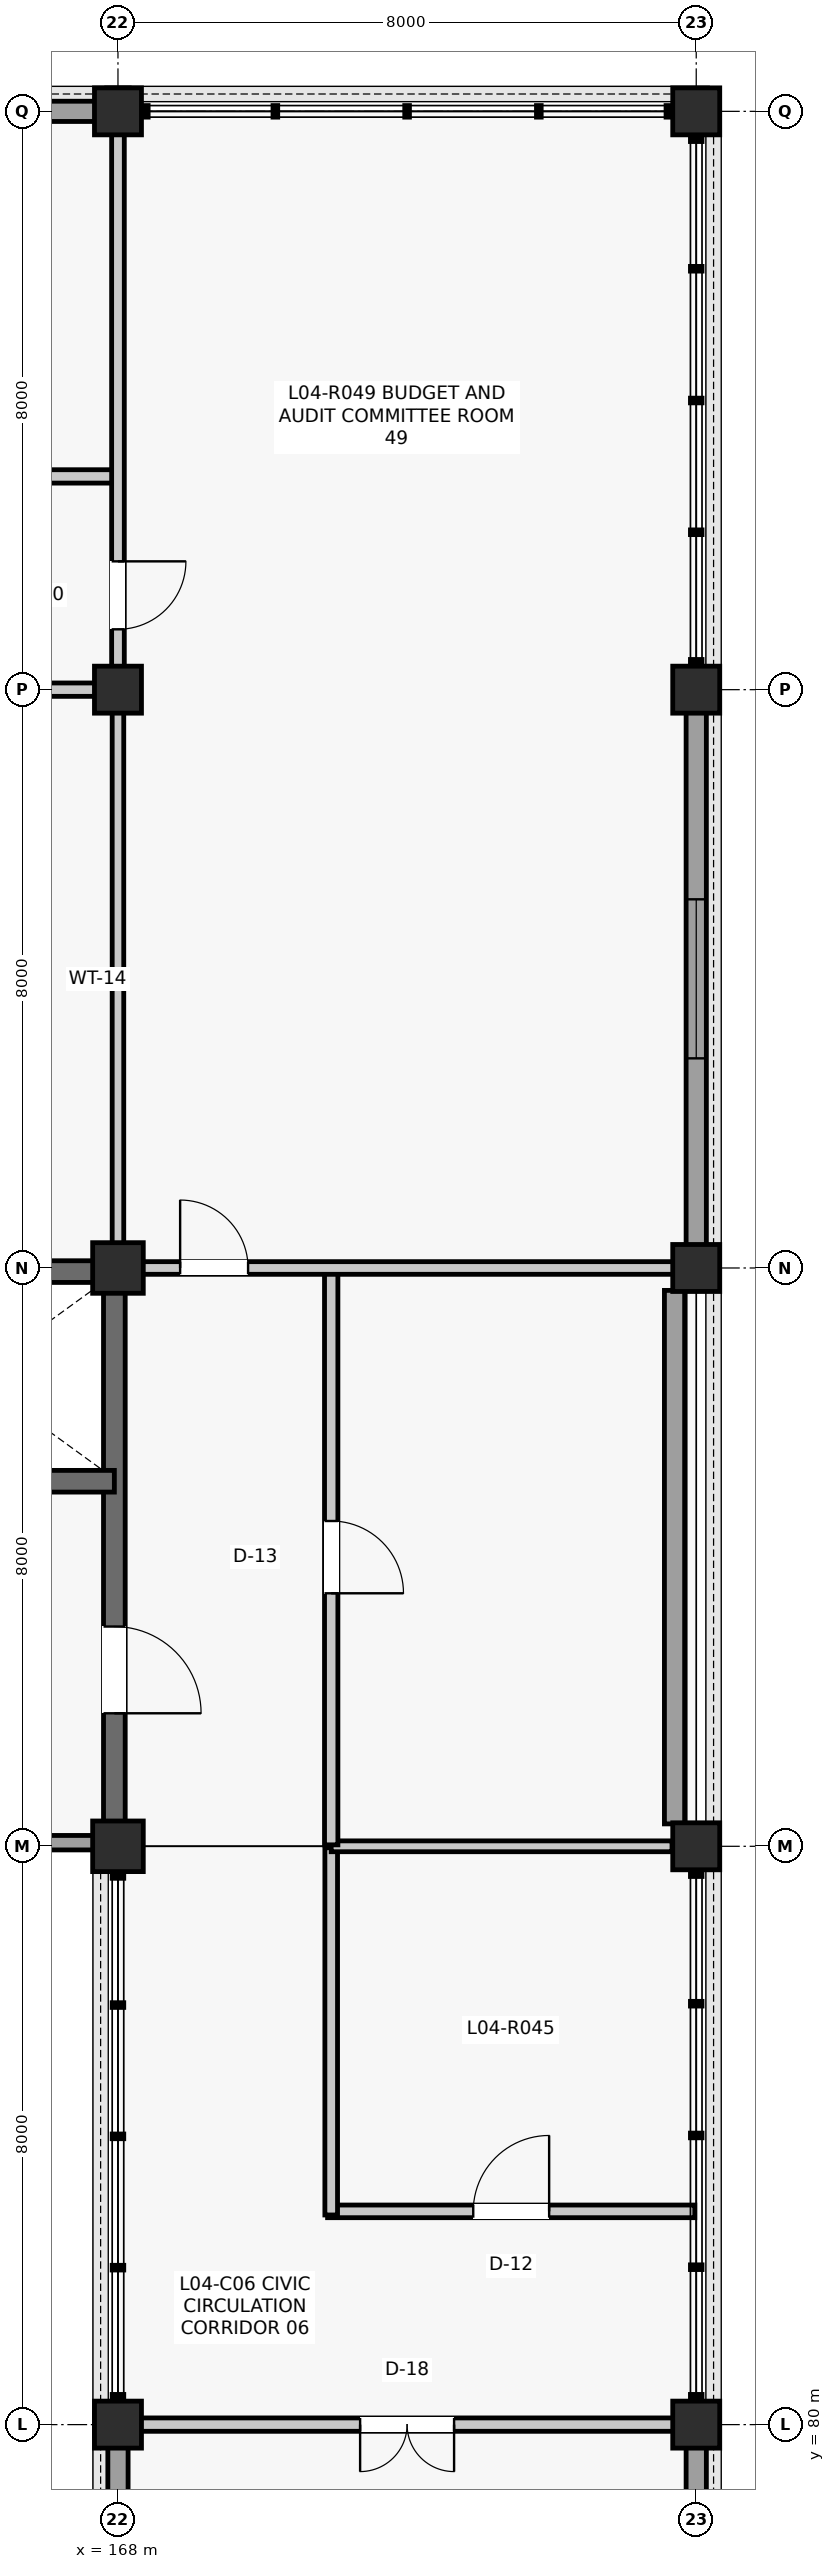
"""IFC4 building model, lengths in metres.
Left out: names, types, materials, properties, quantities, classifications, styles, units other than length and angle.
Written with IfcOpenShell. Run it as: python <this file> out.ifc"""

import sys

from ifc_helpers import new_model, si_unit, direction, frame, frame_2d, origin, origin_2d, place, context, subcontext, project, spatial, rectangle, extrude, element, fill, save


model = new_model("IFC4")
c1 = context("Model", 3, precision=1e-05, world=origin(), true_north=direction((0.0, 1.0)))
c2 = subcontext(c1, "Body", "Model", "MODEL_VIEW")
j1 = project(units=[si_unit("LENGTHUNIT", "METRE"), si_unit("PLANEANGLEUNIT", "RADIAN")], contexts=[c1])
p1 = place(None, origin())
s1 = spatial("IfcSite", under=j1, at=p1, CompositionType="ELEMENT")
p2 = place(p1, origin())
s2 = spatial("IfcBuilding", under=s1, at=p2, CompositionType="ELEMENT")
p3 = place(p2, frame((0.0, 0.0, 17.82)))
s3 = spatial("IfcBuildingStorey", under=s2, at=p3, CompositionType="ELEMENT", Elevation=17.82)
p4 = place(p3, frame((168.0, 80.0, 0.0), z_axis=(0.0, 0.0, 1.0), x_axis=(1.0, 0.0, 0.0)))
e1 = element("IfcColumn", 1, at=p4, inside=s3, PredefinedType="COLUMN", context=c2, shape_type="SweptSolid", body=[
    extrude(rectangle(XDim=0.65, YDim=0.65, at=origin_2d()), origin(), (0.0, 0.0, 1.0), 3.96),
])
for number, where, z_axis, x_axis in (
    (2, (168.0, 88.0, 0.0), (0.0, 0.0, 1.0), (1.0, 0.0, 0.0)),
    (3, (168.0, 96.0, 0.0), (0.0, 0.0, 1.0), (1.0, 0.0, 0.0)),
):
    element("IfcColumn", number, at=place(p3, frame(where, z_axis=z_axis, x_axis=x_axis)), inside=s3, PredefinedType="COLUMN", context=c2, shape_type="SweptSolid", body=[
        extrude(rectangle(XDim=0.7, YDim=0.7, at=origin_2d()), origin(), (0.0, 0.0, 1.0), 3.96),
    ])
for number, where, z_axis, x_axis in (
    (4, (168.0, 104.0, 0.0), (0.0, 0.0, 1.0), (1.0, 0.0, 0.0)),
    (5, (168.0, 112.0, 0.0), (0.0, 0.0, 1.0), (1.0, 0.0, 0.0)),
    (6, (176.0, 80.0, 0.0), (0.0, 0.0, 1.0), (1.0, 0.0, 0.0)),
    (7, (176.0, 88.0, 0.0), (0.0, 0.0, 1.0), (1.0, 0.0, 0.0)),
    (8, (176.0, 96.0, 0.0), (0.0, 0.0, 1.0), (1.0, 0.0, 0.0)),
    (9, (176.0, 104.0, 0.0), (0.0, 0.0, 1.0), (1.0, 0.0, 0.0)),
    (10, (176.0, 112.0, 0.0), (0.0, 0.0, 1.0), (1.0, 0.0, 0.0)),
):
    element("IfcColumn", number, at=place(p3, frame(where, z_axis=z_axis, x_axis=x_axis)), inside=s3, PredefinedType="COLUMN", context=c2, shape_type="SweptSolid", body=[
        extrude(rectangle(XDim=0.65, YDim=0.65, at=origin_2d()), origin(), (0.0, 0.0, 1.0), 3.96),
    ])
p5 = place(p3, frame((160.31, 112.0, 0.0), z_axis=(0.0, 0.0, 1.0), x_axis=(1.0, 0.0, 0.0)))
e11 = element("IfcWall", 11, at=p5, inside=s3, PredefinedType="SOLIDWALL", context=c2, shape_type="SweptSolid", body=[
    extrude(rectangle(XDim=7.38, YDim=0.28, at=frame_2d((3.69, 0.0))), origin(), (0.0, 0.0, 1.0), 3.314),
])
p6 = place(p5, frame((2.59, 0.0, 0.9)))
e12 = element("IfcOpeningElement", 12, at=p6, cuts=e11, PredefinedType="OPENING", context=c2, shape_type="SweptSolid", body=[
    extrude(rectangle(XDim=2.2, YDim=2.0, at=frame_2d((1.1, 1.0))), frame((0.0, 0.15, 0.0), z_axis=(0.0, -1.0, 0.0), x_axis=(1.0, 0.0, 0.0)), (0.0, 0.0, 1.0), 0.3),
])
p7 = place(p3, frame((168.0, 72.26, 0.0), z_axis=(0.0, 0.0, 1.0), x_axis=(0.0, 1.0, 0.0)))
e13 = element("IfcWall", 13, at=p7, inside=s3, PredefinedType="SOLIDWALL", context=c2, shape_type="SweptSolid", body=[
    extrude(rectangle(XDim=7.43, YDim=0.28, at=frame_2d((3.715, 0.0))), origin(), (0.0, 0.0, 1.0), 3.309),
])
p8 = place(p7, frame((2.89, 0.0, 0.9)))
e14 = element("IfcOpeningElement", 14, at=p8, cuts=e13, PredefinedType="OPENING", context=c2, shape_type="SweptSolid", body=[
    extrude(rectangle(XDim=1.65, YDim=1.75, at=frame_2d((0.825, 0.875))), frame((0.0, 0.15, 0.0), z_axis=(0.0, -1.0, 0.0), x_axis=(1.0, 0.0, 0.0)), (0.0, 0.0, 1.0), 0.3),
])
p9 = place(p3, frame((176.0, 72.26, 0.0), z_axis=(0.0, 0.0, 1.0), x_axis=(0.0, 1.0, 0.0)))
e15 = element("IfcWall", 15, at=p9, inside=s3, PredefinedType="SOLIDWALL", context=c2, shape_type="SweptSolid", body=[
    extrude(rectangle(XDim=7.43, YDim=0.28, at=frame_2d((3.715, 0.0))), origin(), (0.0, 0.0, 1.0), 3.372),
])
p10 = place(p9, frame((2.89, 0.0, 0.9)))
e16 = element("IfcOpeningElement", 16, at=p10, cuts=e15, PredefinedType="OPENING", context=c2, shape_type="SweptSolid", body=[
    extrude(rectangle(XDim=1.65, YDim=1.75, at=frame_2d((0.825, 0.875))), frame((0.0, 0.15, 0.0), z_axis=(0.0, -1.0, 0.0), x_axis=(1.0, 0.0, 0.0)), (0.0, 0.0, 1.0), 0.3),
])
p11 = place(p3, frame((175.7, 88.31, 0.0), z_axis=(0.0, 0.0, 1.0), x_axis=(0.0, 1.0, 0.0)))
e17 = element("IfcWall", 17, at=p11, inside=s3, PredefinedType="SOLIDWALL", context=c2, shape_type="SweptSolid", body=[
    extrude(rectangle(XDim=7.38, YDim=0.28, at=frame_2d((3.69, 0.0))), origin(), (0.0, 0.0, 1.0), 3.374),
])
p12 = place(p3, frame((176.0, 96.31, 0.0), z_axis=(0.0, 0.0, 1.0), x_axis=(0.0, 1.0, 0.0)))
e18 = element("IfcWall", 18, at=p12, inside=s3, PredefinedType="SOLIDWALL", context=c2, shape_type="SweptSolid", body=[
    extrude(rectangle(XDim=7.38, YDim=0.28, at=frame_2d((3.69, 0.0))), origin(), (0.0, 0.0, 1.0), 3.314),
])
p13 = place(p12, frame((2.59, 0.0, 0.9)))
e19 = element("IfcOpeningElement", 19, at=p13, cuts=e18, PredefinedType="OPENING", context=c2, shape_type="SweptSolid", body=[
    extrude(rectangle(XDim=2.2, YDim=2.0, at=frame_2d((1.1, 1.0))), frame((0.0, 0.15, 0.0), z_axis=(0.0, -1.0, 0.0), x_axis=(1.0, 0.0, 0.0)), (0.0, 0.0, 1.0), 0.3),
])
p14 = place(p3, frame((160.24, 95.95, 0.0), z_axis=(0.0, 0.0, 1.0), x_axis=(1.0, 0.0, 0.0)))
e20 = element("IfcWall", 20, at=p14, inside=s3, PredefinedType="SHEAR", context=c2, shape_type="SweptSolid", body=[
    extrude(rectangle(XDim=7.52, YDim=0.3, at=frame_2d((3.76, 0.0))), origin(), (0.0, 0.0, 1.0), 3.257),
])
p15 = place(p3, frame((167.95, 88.24, 0.0), z_axis=(0.0, 0.0, 1.0), x_axis=(0.0, 1.0, 0.0)))
e21 = element("IfcWall", 21, at=p15, inside=s3, PredefinedType="SHEAR", context=c2, shape_type="SweptSolid", body=[
    extrude(rectangle(XDim=7.52, YDim=0.3, at=frame_2d((3.76, 0.0))), origin(), (0.0, 0.0, 1.0), 3.462),
])
p16 = place(p15, frame((1.6, 0.0, 0.0)))
e22 = element("IfcOpeningElement", 22, at=p16, cuts=e21, PredefinedType="OPENING", context=c2, shape_type="SweptSolid", body=[
    extrude(rectangle(XDim=1.2, YDim=2.15, at=frame_2d((0.6, 1.075))), frame((0.0, 0.16, 0.0), z_axis=(0.0, -1.0, 0.0), x_axis=(1.0, 0.0, 0.0)), (0.0, 0.0, 1.0), 0.32),
])
p17 = place(p3, frame((164.0, 93.05, 0.0), z_axis=(0.0, 0.0, 1.0), x_axis=(1.0, 0.0, 0.0)))
e23 = element("IfcWall", 23, at=p17, inside=s3, PredefinedType="SHEAR", context=c2, shape_type="SweptSolid", body=[
    extrude(rectangle(XDim=3.95, YDim=0.3, at=frame_2d((1.975, 0.0))), origin(), (0.0, 0.0, 1.0), 3.735),
])
p18 = place(p17, frame((1.375, 0.0, 0.0)))
e24 = element("IfcOpeningElement", 24, at=p18, cuts=e23, PredefinedType="OPENING", context=c2, shape_type="SweptSolid", body=[
    extrude(rectangle(XDim=1.2, YDim=2.2, at=frame_2d((0.6, 1.1))), frame((0.0, 0.16, 0.0), z_axis=(0.0, -1.0, 0.0), x_axis=(1.0, 0.0, 0.0)), (0.0, 0.0, 1.0), 0.32),
])
p19 = place(p3, frame((164.0, 88.05, 0.0), z_axis=(0.0, 0.0, 1.0), x_axis=(1.0, 0.0, 0.0)))
e25 = element("IfcWall", 25, at=p19, inside=s3, PredefinedType="PARTITIONING", context=c2, shape_type="SweptSolid", body=[
    extrude(rectangle(XDim=3.66, YDim=0.2, at=frame_2d((1.83, 0.0))), origin(), (0.0, 0.0, 1.0), 3.37),
])
p20 = place(p3, frame((160.02, 106.95, 0.0), z_axis=(0.0, 0.0, 1.0), x_axis=(1.0, 0.0, 0.0)))
e26 = element("IfcWall", 26, at=p20, inside=s3, PredefinedType="PARTITIONING", context=c2, shape_type="SweptSolid", body=[
    extrude(rectangle(XDim=7.96, YDim=0.185, at=frame_2d((3.98, 0.0))), origin(), (0.0, 0.0, 1.0), 3.232),
])
p21 = place(p20, frame((3.42, 0.0, 0.0)))
e27 = element("IfcOpeningElement", 27, at=p21, cuts=e26, PredefinedType="OPENING", context=c2, shape_type="SweptSolid", body=[
    extrude(rectangle(XDim=1.12, YDim=2.22, at=frame_2d((0.56, 1.11))), frame((0.0, 0.103, 0.0), z_axis=(0.0, -1.0, 0.0), x_axis=(1.0, 0.0, 0.0)), (0.0, 0.0, 1.0), 0.205),
])
p22 = place(p3, frame((170.9, 82.95, 0.0), z_axis=(0.0, 0.0, 1.0), x_axis=(1.0, 0.0, 0.0)))
e28 = element("IfcWall", 28, at=p22, inside=s3, PredefinedType="PARTITIONING", context=c2, shape_type="SweptSolid", body=[
    extrude(rectangle(XDim=5.08, YDim=0.175, at=frame_2d((2.54, 0.0))), origin(), (0.0, 0.0, 1.0), 3.298),
])
p23 = place(p22, frame((2.015, 0.0, 0.0)))
e29 = element("IfcOpeningElement", 29, at=p23, cuts=e28, PredefinedType="OPENING", context=c2, shape_type="SweptSolid", body=[
    extrude(rectangle(XDim=1.05, YDim=2.15, at=frame_2d((0.525, 1.075))), frame((0.0, 0.097, 0.0), z_axis=(0.0, -1.0, 0.0), x_axis=(1.0, 0.0, 0.0)), (0.0, 0.0, 1.0), 0.195),
])
p24 = place(p3, frame((170.95, 82.9, 0.0), z_axis=(0.0, 0.0, 1.0), x_axis=(0.0, 1.0, 0.0)))
e30 = element("IfcWall", 30, at=p24, inside=s3, PredefinedType="PARTITIONING", context=c2, shape_type="SweptSolid", body=[
    extrude(rectangle(XDim=5.08, YDim=0.175, at=frame_2d((2.54, 0.0))), origin(), (0.0, 0.0, 1.0), 3.252),
])
p25 = place(p3, frame((170.95, 88.0, 0.0), z_axis=(0.0, 0.0, 1.0), x_axis=(1.0, 0.0, 0.0)))
e31 = element("IfcWall", 31, at=p25, inside=s3, PredefinedType="PARTITIONING", context=c2, shape_type="SweptSolid", body=[
    extrude(rectangle(XDim=4.715, YDim=0.15, at=frame_2d((2.357, 0.0))), origin(), (0.0, 0.0, 1.0), 3.252),
])
p26 = place(p3, frame((170.95, 88.02, 0.0), z_axis=(0.0, 0.0, 1.0), x_axis=(0.0, 1.0, 0.0)))
e32 = element("IfcWall", 32, at=p26, inside=s3, PredefinedType="PARTITIONING", context=c2, shape_type="SweptSolid", body=[
    extrude(rectangle(XDim=7.96, YDim=0.185, at=frame_2d((3.98, 0.0))), origin(), (0.0, 0.0, 1.0), 3.252),
])
p27 = place(p26, frame((3.48, 0.0, 0.0)))
e33 = element("IfcOpeningElement", 33, at=p27, cuts=e32, PredefinedType="OPENING", context=c2, shape_type="SweptSolid", body=[
    extrude(rectangle(XDim=1.0, YDim=2.15, at=frame_2d((0.5, 1.075))), frame((0.0, 0.103, 0.0), z_axis=(0.0, -1.0, 0.0), x_axis=(1.0, 0.0, 0.0)), (0.0, 0.0, 1.0), 0.205),
])
p28 = place(p3, frame((168.0, 96.34, 0.0), z_axis=(0.0, 0.0, 1.0), x_axis=(0.0, 1.0, 0.0)))
e34 = element("IfcWall", 34, at=p28, inside=s3, PredefinedType="PARTITIONING", context=c2, shape_type="SweptSolid", body=[
    extrude(rectangle(XDim=7.345, YDim=0.16, at=frame_2d((3.672, 0.0))), origin(), (0.0, 0.0, 1.0), 3.257),
])
p29 = place(p3, frame((160.315, 104.0, 0.0), z_axis=(0.0, 0.0, 1.0), x_axis=(1.0, 0.0, 0.0)))
e35 = element("IfcWall", 35, at=p29, inside=s3, PredefinedType="PARTITIONING", context=c2, shape_type="SweptSolid", body=[
    extrude(rectangle(XDim=7.37, YDim=0.185, at=frame_2d((3.685, 0.0))), origin(), (0.0, 0.0, 1.0), 3.263),
])
p30 = place(p29, frame((1.367, 0.0, 0.0)))
e36 = element("IfcOpeningElement", 36, at=p30, cuts=e35, PredefinedType="OPENING", context=c2, shape_type="SweptSolid", body=[
    extrude(rectangle(XDim=0.95, YDim=2.1, at=frame_2d((0.475, 1.05))), frame((0.0, 0.103, 0.0), z_axis=(0.0, -1.0, 0.0), x_axis=(1.0, 0.0, 0.0)), (0.0, 0.0, 1.0), 0.205),
])
p31 = place(p29, frame((5.421, 0.0, 0.0)))
e37 = element("IfcOpeningElement", 37, at=p31, cuts=e35, PredefinedType="OPENING", context=c2, shape_type="SweptSolid", body=[
    extrude(rectangle(XDim=0.95, YDim=2.1, at=frame_2d((0.475, 1.05))), frame((0.0, 0.103, 0.0), z_axis=(0.0, -1.0, 0.0), x_axis=(1.0, 0.0, 0.0)), (0.0, 0.0, 1.0), 0.205),
])
p32 = place(p3, frame((168.0, 104.315, 0.0), z_axis=(0.0, 0.0, 1.0), x_axis=(0.0, 1.0, 0.0)))
e38 = element("IfcWall", 38, at=p32, inside=s3, PredefinedType="PARTITIONING", context=c2, shape_type="SweptSolid", body=[
    extrude(rectangle(XDim=7.37, YDim=0.175, at=frame_2d((3.685, 0.0))), origin(), (0.0, 0.0, 1.0), 3.263),
])
p33 = place(p32, frame((0.52, 0.0, 0.0)))
e39 = element("IfcOpeningElement", 39, at=p33, cuts=e38, PredefinedType="OPENING", context=c2, shape_type="SweptSolid", body=[
    extrude(rectangle(XDim=0.94, YDim=2.12, at=frame_2d((0.47, 1.06))), frame((0.0, 0.097, 0.0), z_axis=(0.0, -1.0, 0.0), x_axis=(1.0, 0.0, 0.0)), (0.0, 0.0, 1.0), 0.195),
])
p34 = place(p3, frame((168.315, 80.0, 0.0), z_axis=(0.0, 0.0, 1.0), x_axis=(1.0, 0.0, 0.0)))
e40 = element("IfcWall", 40, at=p34, inside=s3, PredefinedType="PARTITIONING", context=c2, shape_type="SweptSolid", body=[
    extrude(rectangle(XDim=7.37, YDim=0.185, at=frame_2d((3.685, 0.0))), origin(), (0.0, 0.0, 1.0), 3.457),
])
p35 = place(p34, frame((3.035, 0.0, 0.0)))
e41 = element("IfcOpeningElement", 41, at=p35, cuts=e40, PredefinedType="OPENING", context=c2, shape_type="SweptSolid", body=[
    extrude(rectangle(XDim=1.3, YDim=2.2, at=frame_2d((0.65, 1.1))), frame((0.0, 0.103, 0.0), z_axis=(0.0, -1.0, 0.0), x_axis=(1.0, 0.0, 0.0)), (0.0, 0.0, 1.0), 0.205),
])
p36 = place(p3, frame((168.34, 96.0, 0.0), z_axis=(0.0, 0.0, 1.0), x_axis=(1.0, 0.0, 0.0)))
e42 = element("IfcWall", 42, at=p36, inside=s3, PredefinedType="PARTITIONING", context=c2, shape_type="SweptSolid", body=[
    extrude(rectangle(XDim=7.345, YDim=0.175, at=frame_2d((3.672, 0.0))), origin(), (0.0, 0.0, 1.0), 3.263),
])
p37 = place(p36, frame((0.52, 0.0, 0.0)))
e43 = element("IfcOpeningElement", 43, at=p37, cuts=e42, PredefinedType="OPENING", context=c2, shape_type="SweptSolid", body=[
    extrude(rectangle(XDim=0.94, YDim=2.12, at=frame_2d((0.47, 1.06))), frame((0.0, 0.097, 0.0), z_axis=(0.0, -1.0, 0.0), x_axis=(1.0, 0.0, 0.0)), (0.0, 0.0, 1.0), 0.195),
])
p38 = place(p13, origin())
e44 = element("IfcWindow", 44, at=p38, inside=s3, PartitioningType="SINGLE_PANEL", PredefinedType="WINDOW", context=c2, shape_type="SweptSolid", body=[
    extrude(rectangle(XDim=2.2, YDim=2.0, at=frame_2d((1.1, 1.0))), frame((0.0, 0.03, 0.0), z_axis=(0.0, -1.0, 0.0), x_axis=(1.0, 0.0, 0.0)), (0.0, 0.0, 1.0), 0.06),
])
fill(e19, e44)
p39 = place(p16, frame((1.2, 0.0, 0.0), z_axis=(0.0, 0.0, 1.0), x_axis=(-1.0, 0.0, 0.0)))
e45 = element("IfcDoor", 45, at=p39, inside=s3, OperationType="SINGLE_SWING_LEFT", PredefinedType="DOOR", context=c2, shape_type="SweptSolid", body=[
    extrude(rectangle(XDim=1.2, YDim=2.15, at=frame_2d((0.6, 1.075))), frame((0.0, 0.025, 0.0), z_axis=(0.0, -1.0, 0.0), x_axis=(1.0, 0.0, 0.0)), (0.0, 0.0, 1.0), 0.05),
])
fill(e22, e45)
p40 = place(p23, origin())
e46 = element("IfcDoor", 46, at=p40, inside=s3, OperationType="SINGLE_SWING_RIGHT", PredefinedType="DOOR", context=c2, shape_type="SweptSolid", body=[
    extrude(rectangle(XDim=1.05, YDim=2.15, at=frame_2d((0.525, 1.075))), frame((0.0, 0.025, 0.0), z_axis=(0.0, -1.0, 0.0), x_axis=(1.0, 0.0, 0.0)), (0.0, 0.0, 1.0), 0.05),
])
fill(e29, e46)
p41 = place(p27, frame((1.0, 0.0, 0.0), z_axis=(0.0, 0.0, 1.0), x_axis=(-1.0, 0.0, 0.0)))
e47 = element("IfcDoor", 47, at=p41, inside=s3, OperationType="SINGLE_SWING_LEFT", PredefinedType="DOOR", context=c2, shape_type="SweptSolid", body=[
    extrude(rectangle(XDim=1.0, YDim=2.15, at=frame_2d((0.5, 1.075))), frame((0.0, 0.025, 0.0), z_axis=(0.0, -1.0, 0.0), x_axis=(1.0, 0.0, 0.0)), (0.0, 0.0, 1.0), 0.05),
])
fill(e33, e47)
p42 = place(p33, frame((0.94, 0.0, 0.0), z_axis=(0.0, 0.0, 1.0), x_axis=(-1.0, 0.0, 0.0)))
e48 = element("IfcDoor", 48, at=p42, inside=s3, OperationType="SINGLE_SWING_RIGHT", PredefinedType="DOOR", context=c2, shape_type="SweptSolid", body=[
    extrude(rectangle(XDim=0.94, YDim=2.12, at=frame_2d((0.47, 1.06))), frame((0.0, 0.025, 0.0), z_axis=(0.0, -1.0, 0.0), x_axis=(1.0, 0.0, 0.0)), (0.0, 0.0, 1.0), 0.05),
])
fill(e39, e48)
p43 = place(p35, frame((1.3, 0.0, 0.0), z_axis=(0.0, 0.0, 1.0), x_axis=(-1.0, 0.0, 0.0)))
e49 = element("IfcDoor", 49, at=p43, inside=s3, OperationType="DOUBLE_DOOR_SINGLE_SWING", PredefinedType="DOOR", context=c2, shape_type="SweptSolid", body=[
    extrude(rectangle(XDim=1.3, YDim=2.2, at=frame_2d((0.65, 1.1))), frame((0.0, 0.025, 0.0), z_axis=(0.0, -1.0, 0.0), x_axis=(1.0, 0.0, 0.0)), (0.0, 0.0, 1.0), 0.05),
])
fill(e41, e49)
p44 = place(p37, origin())
e50 = element("IfcDoor", 50, at=p44, inside=s3, OperationType="SINGLE_SWING_LEFT", PredefinedType="DOOR", context=c2, shape_type="SweptSolid", body=[
    extrude(rectangle(XDim=0.94, YDim=2.12, at=frame_2d((0.47, 1.06))), frame((0.0, 0.025, 0.0), z_axis=(0.0, -1.0, 0.0), x_axis=(1.0, 0.0, 0.0)), (0.0, 0.0, 1.0), 0.05),
])
fill(e43, e50)
save(model, sys.argv[1])
